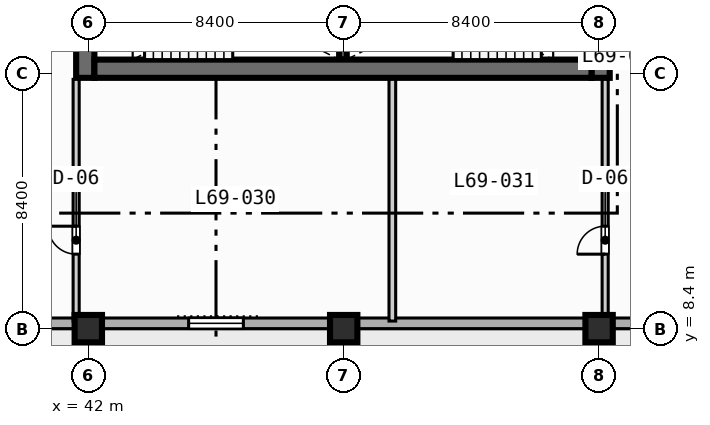
"""IFC4 building model, lengths in metres.
Left out: names, types, materials, properties, quantities, classifications, styles, units other than length and angle.
Written with IfcOpenShell. Run it as: python <this file> out.ifc"""

import sys

from ifc_helpers import new_model, si_unit, direction, frame, frame_2d, origin, origin_2d, place, context, subcontext, project, spatial, rectangle, extrude, element, fill, save


model = new_model("IFC4")
c1 = context("Model", 3, precision=1e-05, world=origin(), true_north=direction((0.0, 1.0)))
c2 = subcontext(c1, "Body", "Model", "MODEL_VIEW")
j1 = project(units=[si_unit("LENGTHUNIT", "METRE"), si_unit("PLANEANGLEUNIT", "RADIAN")], contexts=[c1])
p1 = place(None, origin())
s1 = spatial("IfcSite", under=j1, at=p1, CompositionType="ELEMENT")
p2 = place(p1, origin())
s2 = spatial("IfcBuilding", under=s1, at=p2, CompositionType="ELEMENT")
p3 = place(p2, frame((0.0, 0.0, 278.6)))
s3 = spatial("IfcBuildingStorey", under=s2, at=p3, CompositionType="ELEMENT", Elevation=278.6)
p4 = place(p3, frame((50.375, 17.25, 0.0), z_axis=(0.0, 0.0, 1.0), x_axis=(0.0, 1.0, 0.0)))
e1 = element("IfcWall", 1, at=p4, inside=s3, PredefinedType="SOLIDWALL", context=c2, shape_type="SweptSolid", body=[
    extrude(rectangle(XDim=3.5, YDim=0.25, at=frame_2d((1.75, 0.0))), origin(), (0.0, 0.0, 1.0), 3.47),
])
for number, where, z_axis, x_axis in (
    (2, (41.9, 16.65, 0.0), (0.0, 0.0, 1.0), (0.0, 1.0, 0.0)),
    (3, (58.85, 16.65, 0.0), (0.0, 0.0, 1.0), (0.0, 1.0, 0.0)),
):
    element("IfcWall", number, at=place(p3, frame(where, z_axis=z_axis, x_axis=x_axis)), inside=s3, PredefinedType="SHEAR", context=c2, shape_type="SweptSolid", body=[
        extrude(rectangle(XDim=1.35, YDim=0.6, at=frame_2d((0.675, 0.0))), origin(), (0.0, 0.0, 1.0), 3.47),
    ])
p5 = place(p3, frame((42.2, 16.95, 0.0), z_axis=(0.0, 0.0, 1.0), x_axis=(1.0, 0.0, 0.0)))
e4 = element("IfcWall", 4, at=p5, inside=s3, PredefinedType="SHEAR", context=c2, shape_type="SweptSolid", body=[
    extrude(rectangle(XDim=16.35, YDim=0.6, at=frame_2d((8.175, 0.0))), origin(), (0.0, 0.0, 1.0), 3.47),
])
for number, where, z_axis, x_axis in (
    (5, (42.0, 8.4, 0.0), (0.0, 0.0, 1.0), (1.0, 0.0, 0.0)),
    (6, (50.4, 8.4, 0.0), (0.0, 0.0, 1.0), (1.0, 0.0, 0.0)),
    (7, (58.8, 8.4, 0.0), (0.0, 0.0, 1.0), (1.0, 0.0, 0.0)),
):
    element("IfcColumn", number, at=place(p3, frame(where, z_axis=z_axis, x_axis=x_axis)), inside=s3, PredefinedType="COLUMN", context=c2, shape_type="SweptSolid", body=[
        extrude(rectangle(XDim=0.9, YDim=0.9, at=origin_2d()), origin(), (0.0, 0.0, 1.0), 3.7),
    ])
p6 = place(p3, frame((72.425, 8.575, 0.0), z_axis=(0.0, 0.0, 1.0), x_axis=(-1.0, 0.0, 0.0)))
e8 = element("IfcWall", 8, at=p6, inside=s3, PredefinedType="STANDARD", context=c2, shape_type="SweptSolid", body=[
    extrude(rectangle(XDim=60.85, YDim=0.35, at=frame_2d((30.425, 0.0))), origin(), (0.0, 0.0, 1.0), 3.47),
])
p7 = place(p6, frame((41.825, 0.0, 0.0)))
e9 = element("IfcOpeningElement", 9, at=p7, cuts=e8, PredefinedType="OPENING", context=c2, shape_type="SweptSolid", body=[
    extrude(rectangle(XDim=1.4, YDim=2.2, at=frame_2d((0.7, 1.1))), frame((0.0, 0.185, 0.0), z_axis=(0.0, -1.0, 0.0), x_axis=(1.0, 0.0, 0.0)), (0.0, 0.0, 1.0), 0.37),
])
p8 = place(p6, frame((50.225, 0.0, 0.85)))
e10 = element("IfcOpeningElement", 10, at=p8, cuts=e8, PredefinedType="OPENING", context=c2, shape_type="SweptSolid", body=[
    extrude(rectangle(XDim=2.4, YDim=1.95, at=frame_2d((1.2, 0.975))), frame((0.0, 0.185, 0.0), z_axis=(0.0, -1.0, 0.0), x_axis=(1.0, 0.0, 0.0)), (0.0, 0.0, 1.0), 0.37),
])
p9 = place(p6, frame((33.425, 0.0, 0.85)))
e11 = element("IfcOpeningElement", 11, at=p9, cuts=e8, PredefinedType="OPENING", context=c2, shape_type="SweptSolid", body=[
    extrude(rectangle(XDim=2.4, YDim=1.95, at=frame_2d((1.2, 0.975))), frame((0.0, 0.185, 0.0), z_axis=(0.0, -1.0, 0.0), x_axis=(1.0, 0.0, 0.0)), (0.0, 0.0, 1.0), 0.37),
])
p10 = place(p6, frame((25.325, 0.0, 0.85)))
e12 = element("IfcOpeningElement", 12, at=p10, cuts=e8, PredefinedType="OPENING", context=c2, shape_type="SweptSolid", body=[
    extrude(rectangle(XDim=1.8, YDim=1.8, at=frame_2d((0.9, 0.9))), frame((0.0, 0.185, 0.0), z_axis=(0.0, -1.0, 0.0), x_axis=(1.0, 0.0, 0.0)), (0.0, 0.0, 1.0), 0.37),
])
p11 = place(p6, frame((56.975, 0.0, 0.85)))
e13 = element("IfcOpeningElement", 13, at=p11, cuts=e8, PredefinedType="OPENING", context=c2, shape_type="SweptSolid", body=[
    extrude(rectangle(XDim=1.8, YDim=1.8, at=frame_2d((0.9, 0.9))), frame((0.0, 0.185, 0.0), z_axis=(0.0, -1.0, 0.0), x_axis=(1.0, 0.0, 0.0)), (0.0, 0.0, 1.0), 0.37),
])
p12 = place(p6, frame((44.725, 0.0, 0.85)))
e14 = element("IfcOpeningElement", 14, at=p12, cuts=e8, PredefinedType="OPENING", context=c2, shape_type="SweptSolid", body=[
    extrude(rectangle(XDim=1.8, YDim=1.8, at=frame_2d((0.9, 0.9))), frame((0.0, 0.185, 0.0), z_axis=(0.0, -1.0, 0.0), x_axis=(1.0, 0.0, 0.0)), (0.0, 0.0, 1.0), 0.37),
])
p13 = place(p3, frame((41.6, 8.65, 0.0), z_axis=(0.0, 0.0, 1.0), x_axis=(0.0, 1.0, 0.0)))
e15 = element("IfcWall", 15, at=p13, inside=s3, PredefinedType="PARTITIONING", context=c2, shape_type="SweptSolid", body=[
    extrude(rectangle(XDim=7.95, YDim=0.2, at=frame_2d((3.975, 0.0))), origin(), (0.0, 0.0, 1.0), 3.47),
])
p14 = place(p13, frame((2.2, 0.0, 0.0)))
e16 = element("IfcOpeningElement", 16, at=p14, cuts=e15, PredefinedType="OPENING", context=c2, shape_type="SweptSolid", body=[
    extrude(rectangle(XDim=0.92, YDim=2.1, at=frame_2d((0.46, 1.05))), frame((0.0, 0.11, 0.0), z_axis=(0.0, -1.0, 0.0), x_axis=(1.0, 0.0, 0.0)), (0.0, 0.0, 1.0), 0.22),
])
p15 = place(p3, frame((59.0, 8.65, 0.0), z_axis=(0.0, 0.0, 1.0), x_axis=(0.0, 1.0, 0.0)))
e17 = element("IfcWall", 17, at=p15, inside=s3, PredefinedType="PARTITIONING", context=c2, shape_type="SweptSolid", body=[
    extrude(rectangle(XDim=7.95, YDim=0.2, at=frame_2d((3.975, 0.0))), origin(), (0.0, 0.0, 1.0), 2.82),
])
p16 = place(p15, frame((2.2, 0.0, 0.0)))
e18 = element("IfcOpeningElement", 18, at=p16, cuts=e17, PredefinedType="OPENING", context=c2, shape_type="SweptSolid", body=[
    extrude(rectangle(XDim=0.92, YDim=2.1, at=frame_2d((0.46, 1.05))), frame((0.0, 0.11, 0.0), z_axis=(0.0, -1.0, 0.0), x_axis=(1.0, 0.0, 0.0)), (0.0, 0.0, 1.0), 0.22),
])
p17 = place(p3, frame((52.0, 8.65, 0.0), z_axis=(0.0, 0.0, 1.0), x_axis=(0.0, 1.0, 0.0)))
e19 = element("IfcWall", 19, at=p17, inside=s3, PredefinedType="PARTITIONING", context=c2, shape_type="SweptSolid", body=[
    extrude(rectangle(XDim=7.95, YDim=0.22, at=frame_2d((3.975, 0.0))), origin(), (0.0, 0.0, 1.0), 3.47),
])
p18 = place(p10, origin())
e20 = element("IfcWindow", 20, at=p18, inside=s3, PartitioningType="SINGLE_PANEL", PredefinedType="WINDOW", context=c2, shape_type="SweptSolid", body=[
    extrude(rectangle(XDim=1.8, YDim=1.8, at=frame_2d((0.9, 0.9))), frame((0.0, 0.03, 0.0), z_axis=(0.0, -1.0, 0.0), x_axis=(1.0, 0.0, 0.0)), (0.0, 0.0, 1.0), 0.06),
])
fill(e12, e20)
p19 = place(p14, origin())
e21 = element("IfcDoor", 21, at=p19, inside=s3, OperationType="SINGLE_SWING_RIGHT", PredefinedType="DOOR", context=c2, shape_type="SweptSolid", body=[
    extrude(rectangle(XDim=0.92, YDim=2.1, at=frame_2d((0.46, 1.05))), frame((0.0, 0.025, 0.0), z_axis=(0.0, -1.0, 0.0), x_axis=(1.0, 0.0, 0.0)), (0.0, 0.0, 1.0), 0.05),
])
fill(e16, e21)
p20 = place(p16, origin())
e22 = element("IfcDoor", 22, at=p20, inside=s3, OperationType="SINGLE_SWING_LEFT", PredefinedType="DOOR", context=c2, shape_type="SweptSolid", body=[
    extrude(rectangle(XDim=0.92, YDim=2.1, at=frame_2d((0.46, 1.05))), frame((0.0, 0.025, 0.0), z_axis=(0.0, -1.0, 0.0), x_axis=(1.0, 0.0, 0.0)), (0.0, 0.0, 1.0), 0.05),
])
fill(e18, e22)
save(model, sys.argv[1])
